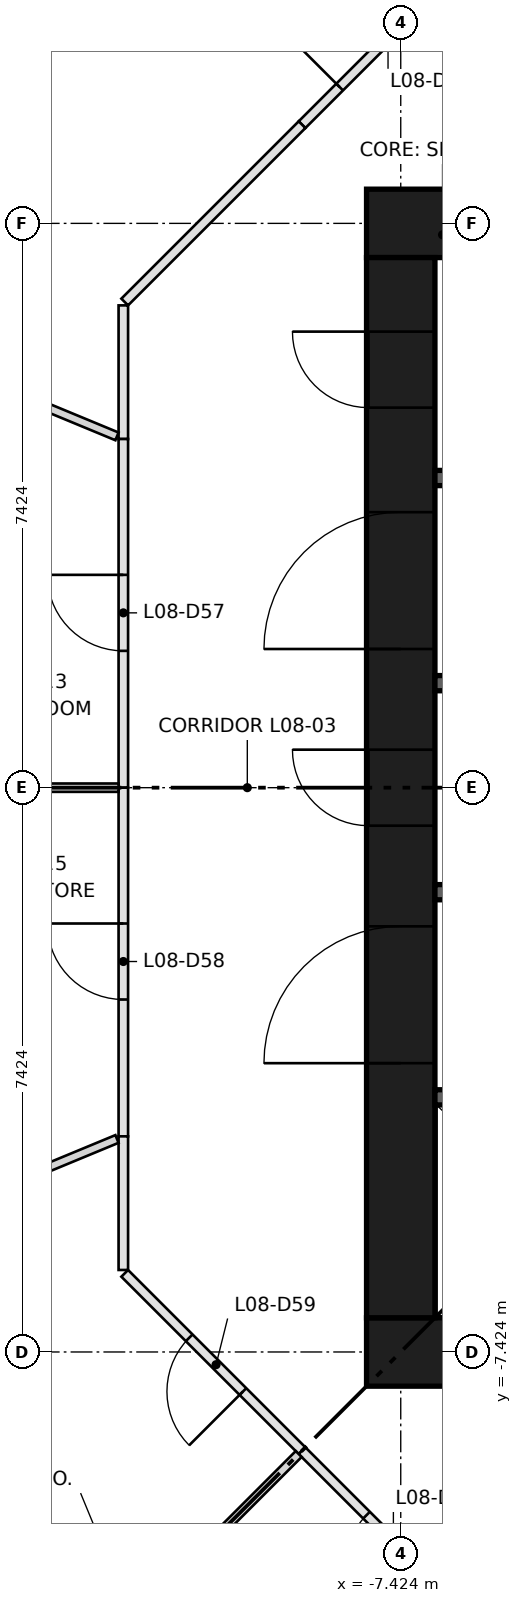
"""IFC4 building model, lengths in metres.
Left out: names, types, materials, properties, quantities, classifications, styles, units other than length and angle.
Written with IfcOpenShell. Run it as: python <this file> out.ifc"""

import sys

from ifc_helpers import new_model, si_unit, direction, frame, frame_2d, origin, place, context, subcontext, project, spatial, rectangle, extrude, element, fill, save


model = new_model("IFC4")
c1 = context("Model", 3, precision=1e-05, world=origin(), true_north=direction((0.0, 1.0)))
c2 = subcontext(c1, "Body", "Model", "MODEL_VIEW")
j1 = project(units=[si_unit("LENGTHUNIT", "METRE"), si_unit("PLANEANGLEUNIT", "RADIAN")], contexts=[c1])
p1 = place(None, origin())
s1 = spatial("IfcSite", under=j1, at=p1, CompositionType="ELEMENT")
p2 = place(p1, origin())
s2 = spatial("IfcBuilding", under=s1, at=p2, CompositionType="ELEMENT")
p3 = place(p2, frame((0.0, 0.0, 33.5)))
s3 = spatial("IfcBuildingStorey", under=s2, at=p3, CompositionType="ELEMENT", Elevation=33.5)
for number, where, z_axis, x_axis in (
    (1, (-7.874, -7.424, 0.0), (0.0, 0.0, 1.0), (1.0, 0.0, 0.0)),
    (2, (-7.874, 7.424, 0.0), (0.0, 0.0, 1.0), (1.0, 0.0, 0.0)),
):
    element("IfcWall", number, at=place(p3, frame(where, z_axis=z_axis, x_axis=x_axis)), inside=s3, PredefinedType="SHEAR", context=c2, shape_type="SweptSolid", body=[
        extrude(rectangle(XDim=15.748, YDim=0.9, at=frame_2d((7.874, 0.0))), origin(), (0.0, 0.0, 1.0), 3.65),
    ])
p4 = place(p3, frame((-7.424, -6.974, 0.0), z_axis=(0.0, 0.0, 1.0), x_axis=(0.0, 1.0, 0.0)))
e3 = element("IfcWall", 3, at=p4, inside=s3, PredefinedType="SHEAR", context=c2, shape_type="SweptSolid", body=[
    extrude(rectangle(XDim=13.948, YDim=0.9, at=frame_2d((6.974, 0.0))), origin(), (0.0, 0.0, 1.0), 3.65),
])
p5 = place(p4, frame((6.474, 0.0, 0.0)))
e4 = element("IfcOpeningElement", 4, at=p5, cuts=e3, PredefinedType="OPENING", context=c2, shape_type="SweptSolid", body=[
    extrude(rectangle(XDim=1.0, YDim=2.1, at=frame_2d((0.5, 1.05))), frame((0.0, 0.46, 0.0), z_axis=(0.0, -1.0, 0.0), x_axis=(1.0, 0.0, 0.0)), (0.0, 0.0, 1.0), 0.92),
])
p6 = place(p4, frame((3.35, 0.0, 0.0)))
e5 = element("IfcOpeningElement", 5, at=p6, cuts=e3, PredefinedType="OPENING", context=c2, shape_type="SweptSolid", body=[
    extrude(rectangle(XDim=1.8, YDim=2.1, at=frame_2d((0.9, 1.05))), frame((0.0, 0.46, 0.0), z_axis=(0.0, -1.0, 0.0), x_axis=(1.0, 0.0, 0.0)), (0.0, 0.0, 1.0), 0.92),
])
p7 = place(p4, frame((8.799, 0.0, 0.0)))
e6 = element("IfcOpeningElement", 6, at=p7, cuts=e3, PredefinedType="OPENING", context=c2, shape_type="SweptSolid", body=[
    extrude(rectangle(XDim=1.8, YDim=2.1, at=frame_2d((0.9, 1.05))), frame((0.0, 0.46, 0.0), z_axis=(0.0, -1.0, 0.0), x_axis=(1.0, 0.0, 0.0)), (0.0, 0.0, 1.0), 0.92),
])
p8 = place(p4, frame((11.974, 0.0, 0.0)))
e7 = element("IfcOpeningElement", 7, at=p8, cuts=e3, PredefinedType="OPENING", context=c2, shape_type="SweptSolid", body=[
    extrude(rectangle(XDim=1.0, YDim=2.1, at=frame_2d((0.5, 1.05))), frame((0.0, 0.46, 0.0), z_axis=(0.0, -1.0, 0.0), x_axis=(1.0, 0.0, 0.0)), (0.0, 0.0, 1.0), 0.92),
])
p9 = place(p3, frame((-6.974, -4.074, 0.0), z_axis=(0.0, 0.0, 1.0), x_axis=(1.0, 0.0, 0.0)))
e8 = element("IfcWall", 8, at=p9, inside=s3, PredefinedType="SHEAR", context=c2, shape_type="SweptSolid", body=[
    extrude(rectangle(XDim=13.948, YDim=0.2, at=frame_2d((6.974, 0.0))), origin(), (0.0, 0.0, 1.0), 3.3),
])
p10 = place(p9, frame((0.918, 0.0, 0.0)))
e9 = element("IfcOpeningElement", 9, at=p10, cuts=e8, PredefinedType="OPENING", context=c2, shape_type="SweptSolid", body=[
    extrude(rectangle(XDim=1.1, YDim=2.1, at=frame_2d((0.55, 1.05))), frame((0.0, 0.11, 0.0), z_axis=(0.0, -1.0, 0.0), x_axis=(1.0, 0.0, 0.0)), (0.0, 0.0, 1.0), 0.22),
])
p11 = place(p9, frame((4.055, 0.0, 0.0)))
e10 = element("IfcOpeningElement", 10, at=p11, cuts=e8, PredefinedType="OPENING", context=c2, shape_type="SweptSolid", body=[
    extrude(rectangle(XDim=1.1, YDim=2.1, at=frame_2d((0.55, 1.05))), frame((0.0, 0.11, 0.0), z_axis=(0.0, -1.0, 0.0), x_axis=(1.0, 0.0, 0.0)), (0.0, 0.0, 1.0), 0.22),
])
p12 = place(p9, frame((6.658, 0.0, 0.0)))
e11 = element("IfcOpeningElement", 11, at=p12, cuts=e8, PredefinedType="OPENING", context=c2, shape_type="SweptSolid", body=[
    extrude(rectangle(XDim=1.0, YDim=2.1, at=frame_2d((0.5, 1.05))), frame((0.0, 0.11, 0.0), z_axis=(0.0, -1.0, 0.0), x_axis=(1.0, 0.0, 0.0)), (0.0, 0.0, 1.0), 0.22),
])
p13 = place(p9, frame((8.627, 0.0, 0.0)))
e12 = element("IfcOpeningElement", 12, at=p13, cuts=e8, PredefinedType="OPENING", context=c2, shape_type="SweptSolid", body=[
    extrude(rectangle(XDim=1.0, YDim=2.1, at=frame_2d((0.5, 1.05))), frame((0.0, 0.11, 0.0), z_axis=(0.0, -1.0, 0.0), x_axis=(1.0, 0.0, 0.0)), (0.0, 0.0, 1.0), 0.22),
])
p14 = place(p9, frame((10.595, 0.0, 0.0)))
e13 = element("IfcOpeningElement", 13, at=p14, cuts=e8, PredefinedType="OPENING", context=c2, shape_type="SweptSolid", body=[
    extrude(rectangle(XDim=1.0, YDim=2.1, at=frame_2d((0.5, 1.05))), frame((0.0, 0.11, 0.0), z_axis=(0.0, -1.0, 0.0), x_axis=(1.0, 0.0, 0.0)), (0.0, 0.0, 1.0), 0.22),
])
p15 = place(p9, frame((12.564, 0.0, 0.0)))
e14 = element("IfcOpeningElement", 14, at=p15, cuts=e8, PredefinedType="OPENING", context=c2, shape_type="SweptSolid", body=[
    extrude(rectangle(XDim=1.0, YDim=2.1, at=frame_2d((0.5, 1.05))), frame((0.0, 0.11, 0.0), z_axis=(0.0, -1.0, 0.0), x_axis=(1.0, 0.0, 0.0)), (0.0, 0.0, 1.0), 0.22),
])
p16 = place(p3, frame((-6.974, 4.074, 0.0), z_axis=(0.0, 0.0, 1.0), x_axis=(1.0, 0.0, 0.0)))
e15 = element("IfcWall", 15, at=p16, inside=s3, PredefinedType="SHEAR", context=c2, shape_type="SweptSolid", body=[
    extrude(rectangle(XDim=6.974, YDim=0.2, at=frame_2d((3.487, 0.0))), origin(), (0.0, 0.0, 1.0), 3.3),
])
for number, where, z_axis, x_axis in (
    (16, (-6.974, -1.375, 0.0), (0.0, 0.0, 1.0), (1.0, 0.0, 0.0)),
    (17, (-6.974, 1.375, 0.0), (0.0, 0.0, 1.0), (1.0, 0.0, 0.0)),
):
    element("IfcWall", number, at=place(p3, frame(where, z_axis=z_axis, x_axis=x_axis)), inside=s3, PredefinedType="SHEAR", context=c2, shape_type="SweptSolid", body=[
        extrude(rectangle(XDim=2.6, YDim=0.2, at=frame_2d((1.3, 0.0))), origin(), (0.0, 0.0, 1.0), 3.3),
    ])
p17 = place(p3, frame((-8.722, 8.722, 0.0), z_axis=(0.0, 0.0, 1.0), x_axis=(0.707069784102, 0.707143776336, 0.0)))
e18 = element("IfcWall", 18, at=p17, inside=s3, PredefinedType="PARTITIONING", context=c2, shape_type="SweptSolid", body=[
    extrude(rectangle(XDim=3.3, YDim=0.125, at=frame_2d((1.65, 0.0))), origin(), (0.0, 0.0, 1.0), 3.3),
])
p18 = place(p17, frame((0.7, 0.0, 0.0)))
e19 = element("IfcOpeningElement", 19, at=p18, cuts=e18, PredefinedType="OPENING", context=c2, shape_type="SweptSolid", body=[
    extrude(rectangle(XDim=1.8, YDim=2.1, at=frame_2d((0.9, 1.05))), frame((0.0, 0.073, 0.0), z_axis=(0.0, -1.0, 0.0), x_axis=(1.0, 0.0, 0.0)), (0.0, 0.0, 1.0), 0.145),
])
p19 = place(p3, frame((-11.074, 4.587, 0.0), z_axis=(0.0, 0.0, 1.0), x_axis=(0.0, 1.0, 0.0)))
e20 = element("IfcWall", 20, at=p19, inside=s3, PredefinedType="PARTITIONING", context=c2, shape_type="SweptSolid", body=[
    extrude(rectangle(XDim=1.758, YDim=0.125, at=frame_2d((0.879, 0.0))), origin(), (0.0, 0.0, 1.0), 3.3),
])
p20 = place(p3, frame((-11.056, 6.389, 0.0), z_axis=(0.0, 0.0, 1.0), x_axis=(0.707143776336, 0.707069784102, 0.0)))
e21 = element("IfcWall", 21, at=p20, inside=s3, PredefinedType="PARTITIONING", context=c2, shape_type="SweptSolid", body=[
    extrude(rectangle(XDim=3.3, YDim=0.125, at=frame_2d((1.65, 0.0))), origin(), (0.0, 0.0, 1.0), 3.3),
])
p21 = place(p3, frame((-11.074, 0.0, 0.0), z_axis=(0.0, 0.0, 1.0), x_axis=(0.0, 1.0, 0.0)))
e22 = element("IfcWall", 22, at=p21, inside=s3, PredefinedType="PARTITIONING", context=c2, shape_type="SweptSolid", body=[
    extrude(rectangle(XDim=4.587, YDim=0.125, at=frame_2d((2.293, 0.0))), origin(), (0.0, 0.0, 1.0), 3.3),
])
p22 = place(p21, frame((1.8, 0.0, 0.0)))
e23 = element("IfcOpeningElement", 23, at=p22, cuts=e22, PredefinedType="OPENING", context=c2, shape_type="SweptSolid", body=[
    extrude(rectangle(XDim=1.0, YDim=2.1, at=frame_2d((0.5, 1.05))), frame((0.0, 0.073, 0.0), z_axis=(0.0, -1.0, 0.0), x_axis=(1.0, 0.0, 0.0)), (0.0, 0.0, 1.0), 0.145),
])
p23 = place(p3, frame((-11.074, -4.587, 0.0), z_axis=(0.0, 0.0, 1.0), x_axis=(0.0, 1.0, 0.0)))
e24 = element("IfcWall", 24, at=p23, inside=s3, PredefinedType="PARTITIONING", context=c2, shape_type="SweptSolid", body=[
    extrude(rectangle(XDim=4.587, YDim=0.125, at=frame_2d((2.293, 0.0))), origin(), (0.0, 0.0, 1.0), 3.3),
])
p24 = place(p23, frame((1.8, 0.0, 0.0)))
e25 = element("IfcOpeningElement", 25, at=p24, cuts=e24, PredefinedType="OPENING", context=c2, shape_type="SweptSolid", body=[
    extrude(rectangle(XDim=1.0, YDim=2.1, at=frame_2d((0.5, 1.05))), frame((0.0, 0.073, 0.0), z_axis=(0.0, -1.0, 0.0), x_axis=(1.0, 0.0, 0.0)), (0.0, 0.0, 1.0), 0.145),
])
p25 = place(p3, frame((-11.074, -6.345, 0.0), z_axis=(0.0, 0.0, 1.0), x_axis=(0.0, 1.0, 0.0)))
e26 = element("IfcWall", 26, at=p25, inside=s3, PredefinedType="PARTITIONING", context=c2, shape_type="SweptSolid", body=[
    extrude(rectangle(XDim=1.758, YDim=0.125, at=frame_2d((0.879, 0.0))), origin(), (0.0, 0.0, 1.0), 3.3),
])
p26 = place(p3, frame((-8.722, -8.722, 0.0), z_axis=(0.0, 0.0, 1.0), x_axis=(-0.707143776336, 0.707069784102, 0.0)))
e27 = element("IfcWall", 27, at=p26, inside=s3, PredefinedType="PARTITIONING", context=c2, shape_type="SweptSolid", body=[
    extrude(rectangle(XDim=3.3, YDim=0.125, at=frame_2d((1.65, 0.0))), origin(), (0.0, 0.0, 1.0), 3.3),
])
p27 = place(p26, frame((1.1, 0.0, 0.0)))
e28 = element("IfcOpeningElement", 28, at=p27, cuts=e27, PredefinedType="OPENING", context=c2, shape_type="SweptSolid", body=[
    extrude(rectangle(XDim=1.0, YDim=2.1, at=frame_2d((0.5, 1.05))), frame((0.0, 0.073, 0.0), z_axis=(0.0, -1.0, 0.0), x_axis=(1.0, 0.0, 0.0)), (0.0, 0.0, 1.0), 0.145),
])
p28 = place(p3, frame((-6.389, -11.056, 0.0), z_axis=(0.0, 0.0, 1.0), x_axis=(-0.707069784102, 0.707143776336, 0.0)))
e29 = element("IfcWall", 29, at=p28, inside=s3, PredefinedType="PARTITIONING", context=c2, shape_type="SweptSolid", body=[
    extrude(rectangle(XDim=3.3, YDim=0.125, at=frame_2d((1.65, 0.0))), origin(), (0.0, 0.0, 1.0), 3.3),
])
p29 = place(p28, frame((1.1, 0.0, 0.0)))
e30 = element("IfcOpeningElement", 30, at=p29, cuts=e29, PredefinedType="OPENING", context=c2, shape_type="SweptSolid", body=[
    extrude(rectangle(XDim=1.0, YDim=2.1, at=frame_2d((0.5, 1.05))), frame((0.0, 0.073, 0.0), z_axis=(0.0, -1.0, 0.0), x_axis=(1.0, 0.0, 0.0)), (0.0, 0.0, 1.0), 0.145),
])
p30 = place(p3, frame((-11.157, 4.622, 0.0), z_axis=(0.0, 0.0, 1.0), x_axis=(-0.923876757744, 0.382690131178, 0.0)))
e31 = element("IfcWall", 31, at=p30, inside=s3, PredefinedType="PARTITIONING", context=c2, shape_type="SweptSolid", body=[
    extrude(rectangle(XDim=1.423, YDim=0.11, at=frame_2d((0.712, 0.0))), origin(), (0.0, 0.0, 1.0), 3.3),
])
p31 = place(p3, frame((-11.136, 0.0, 0.0), z_axis=(0.0, 0.0, 1.0), x_axis=(-1.0, 0.0, 0.0)))
e32 = element("IfcWall", 32, at=p31, inside=s3, PredefinedType="PARTITIONING", context=c2, shape_type="SweptSolid", body=[
    extrude(rectangle(XDim=2.305, YDim=0.11, at=frame_2d((1.152, 0.0))), origin(), (0.0, 0.0, 1.0), 3.3),
])
p32 = place(p3, frame((-11.157, -4.622, 0.0), z_axis=(0.0, 0.0, 1.0), x_axis=(-0.923876757744, -0.382690131178, 0.0)))
e33 = element("IfcWall", 33, at=p32, inside=s3, PredefinedType="PARTITIONING", context=c2, shape_type="SweptSolid", body=[
    extrude(rectangle(XDim=1.423, YDim=0.11, at=frame_2d((0.712, 0.0))), origin(), (0.0, 0.0, 1.0), 3.3),
])
p33 = place(p3, frame((-13.131, -13.131, 0.0), z_axis=(0.0, 0.0, 1.0), x_axis=(0.707106781187, 0.707106781187, 0.0)))
e34 = element("IfcWall", 34, at=p33, inside=s3, PredefinedType="PARTITIONING", context=c2, shape_type="SweptSolid", body=[
    extrude(rectangle(XDim=6.172, YDim=0.11, at=frame_2d((3.086, 0.0))), origin(), (0.0, 0.0, 1.0), 3.3),
])
p34 = place(p5, origin())
e35 = element("IfcDoor", 35, at=p34, inside=s3, OperationType="SINGLE_SWING_RIGHT", PredefinedType="DOOR", context=c2, shape_type="SweptSolid", body=[
    extrude(rectangle(XDim=1.0, YDim=2.1, at=frame_2d((0.5, 1.05))), frame((0.0, 0.45, 0.0), z_axis=(0.0, -1.0, 0.0), x_axis=(1.0, 0.0, 0.0)), (0.0, 0.0, 1.0), 0.05),
])
fill(e4, e35)
p35 = place(p6, origin())
e36 = element("IfcDoor", 36, at=p35, inside=s3, OperationType="DOUBLE_DOOR_SINGLE_SWING", PredefinedType="DOOR", context=c2, shape_type="SweptSolid", body=[
    extrude(rectangle(XDim=1.8, YDim=2.1, at=frame_2d((0.9, 1.05))), frame((0.0, 0.025, 0.0), z_axis=(0.0, -1.0, 0.0), x_axis=(1.0, 0.0, 0.0)), (0.0, 0.0, 1.0), 0.05),
])
fill(e5, e36)
p36 = place(p7, origin())
e37 = element("IfcDoor", 37, at=p36, inside=s3, OperationType="DOUBLE_DOOR_SINGLE_SWING", PredefinedType="DOOR", context=c2, shape_type="SweptSolid", body=[
    extrude(rectangle(XDim=1.8, YDim=2.1, at=frame_2d((0.9, 1.05))), frame((0.0, 0.025, 0.0), z_axis=(0.0, -1.0, 0.0), x_axis=(1.0, 0.0, 0.0)), (0.0, 0.0, 1.0), 0.05),
])
fill(e6, e37)
p37 = place(p8, origin())
e38 = element("IfcDoor", 38, at=p37, inside=s3, OperationType="SINGLE_SWING_RIGHT", PredefinedType="DOOR", context=c2, shape_type="SweptSolid", body=[
    extrude(rectangle(XDim=1.0, YDim=2.1, at=frame_2d((0.5, 1.05))), frame((0.0, 0.45, 0.0), z_axis=(0.0, -1.0, 0.0), x_axis=(1.0, 0.0, 0.0)), (0.0, 0.0, 1.0), 0.05),
])
fill(e7, e38)
p38 = place(p18, origin())
e39 = element("IfcDoor", 39, at=p38, inside=s3, OperationType="DOUBLE_DOOR_SINGLE_SWING", PredefinedType="DOOR", context=c2, shape_type="SweptSolid", body=[
    extrude(rectangle(XDim=1.8, YDim=2.1, at=frame_2d((0.9, 1.05))), frame((0.0, 0.025, 0.0), z_axis=(0.0, -1.0, 0.0), x_axis=(1.0, 0.0, 0.0)), (0.0, 0.0, 1.0), 0.05),
])
fill(e19, e39)
p39 = place(p22, origin())
e40 = element("IfcDoor", 40, at=p39, inside=s3, OperationType="SINGLE_SWING_RIGHT", PredefinedType="DOOR", context=c2, shape_type="SweptSolid", body=[
    extrude(rectangle(XDim=1.0, YDim=2.1, at=frame_2d((0.5, 1.05))), frame((0.0, 0.025, 0.0), z_axis=(0.0, -1.0, 0.0), x_axis=(1.0, 0.0, 0.0)), (0.0, 0.0, 1.0), 0.05),
])
fill(e23, e40)
p40 = place(p24, origin())
e41 = element("IfcDoor", 41, at=p40, inside=s3, OperationType="SINGLE_SWING_RIGHT", PredefinedType="DOOR", context=c2, shape_type="SweptSolid", body=[
    extrude(rectangle(XDim=1.0, YDim=2.1, at=frame_2d((0.5, 1.05))), frame((0.0, 0.025, 0.0), z_axis=(0.0, -1.0, 0.0), x_axis=(1.0, 0.0, 0.0)), (0.0, 0.0, 1.0), 0.05),
])
fill(e25, e41)
p41 = place(p27, origin())
e42 = element("IfcDoor", 42, at=p41, inside=s3, OperationType="SINGLE_SWING_LEFT", PredefinedType="DOOR", context=c2, shape_type="SweptSolid", body=[
    extrude(rectangle(XDim=1.0, YDim=2.1, at=frame_2d((0.5, 1.05))), frame((0.0, 0.025, 0.0), z_axis=(0.0, -1.0, 0.0), x_axis=(1.0, 0.0, 0.0)), (0.0, 0.0, 1.0), 0.05),
])
fill(e28, e42)
p42 = place(p29, origin())
e43 = element("IfcDoor", 43, at=p42, inside=s3, OperationType="SINGLE_SWING_LEFT", PredefinedType="DOOR", context=c2, shape_type="SweptSolid", body=[
    extrude(rectangle(XDim=1.0, YDim=2.1, at=frame_2d((0.5, 1.05))), frame((0.0, 0.025, 0.0), z_axis=(0.0, -1.0, 0.0), x_axis=(1.0, 0.0, 0.0)), (0.0, 0.0, 1.0), 0.05),
])
fill(e30, e43)
save(model, sys.argv[1])
